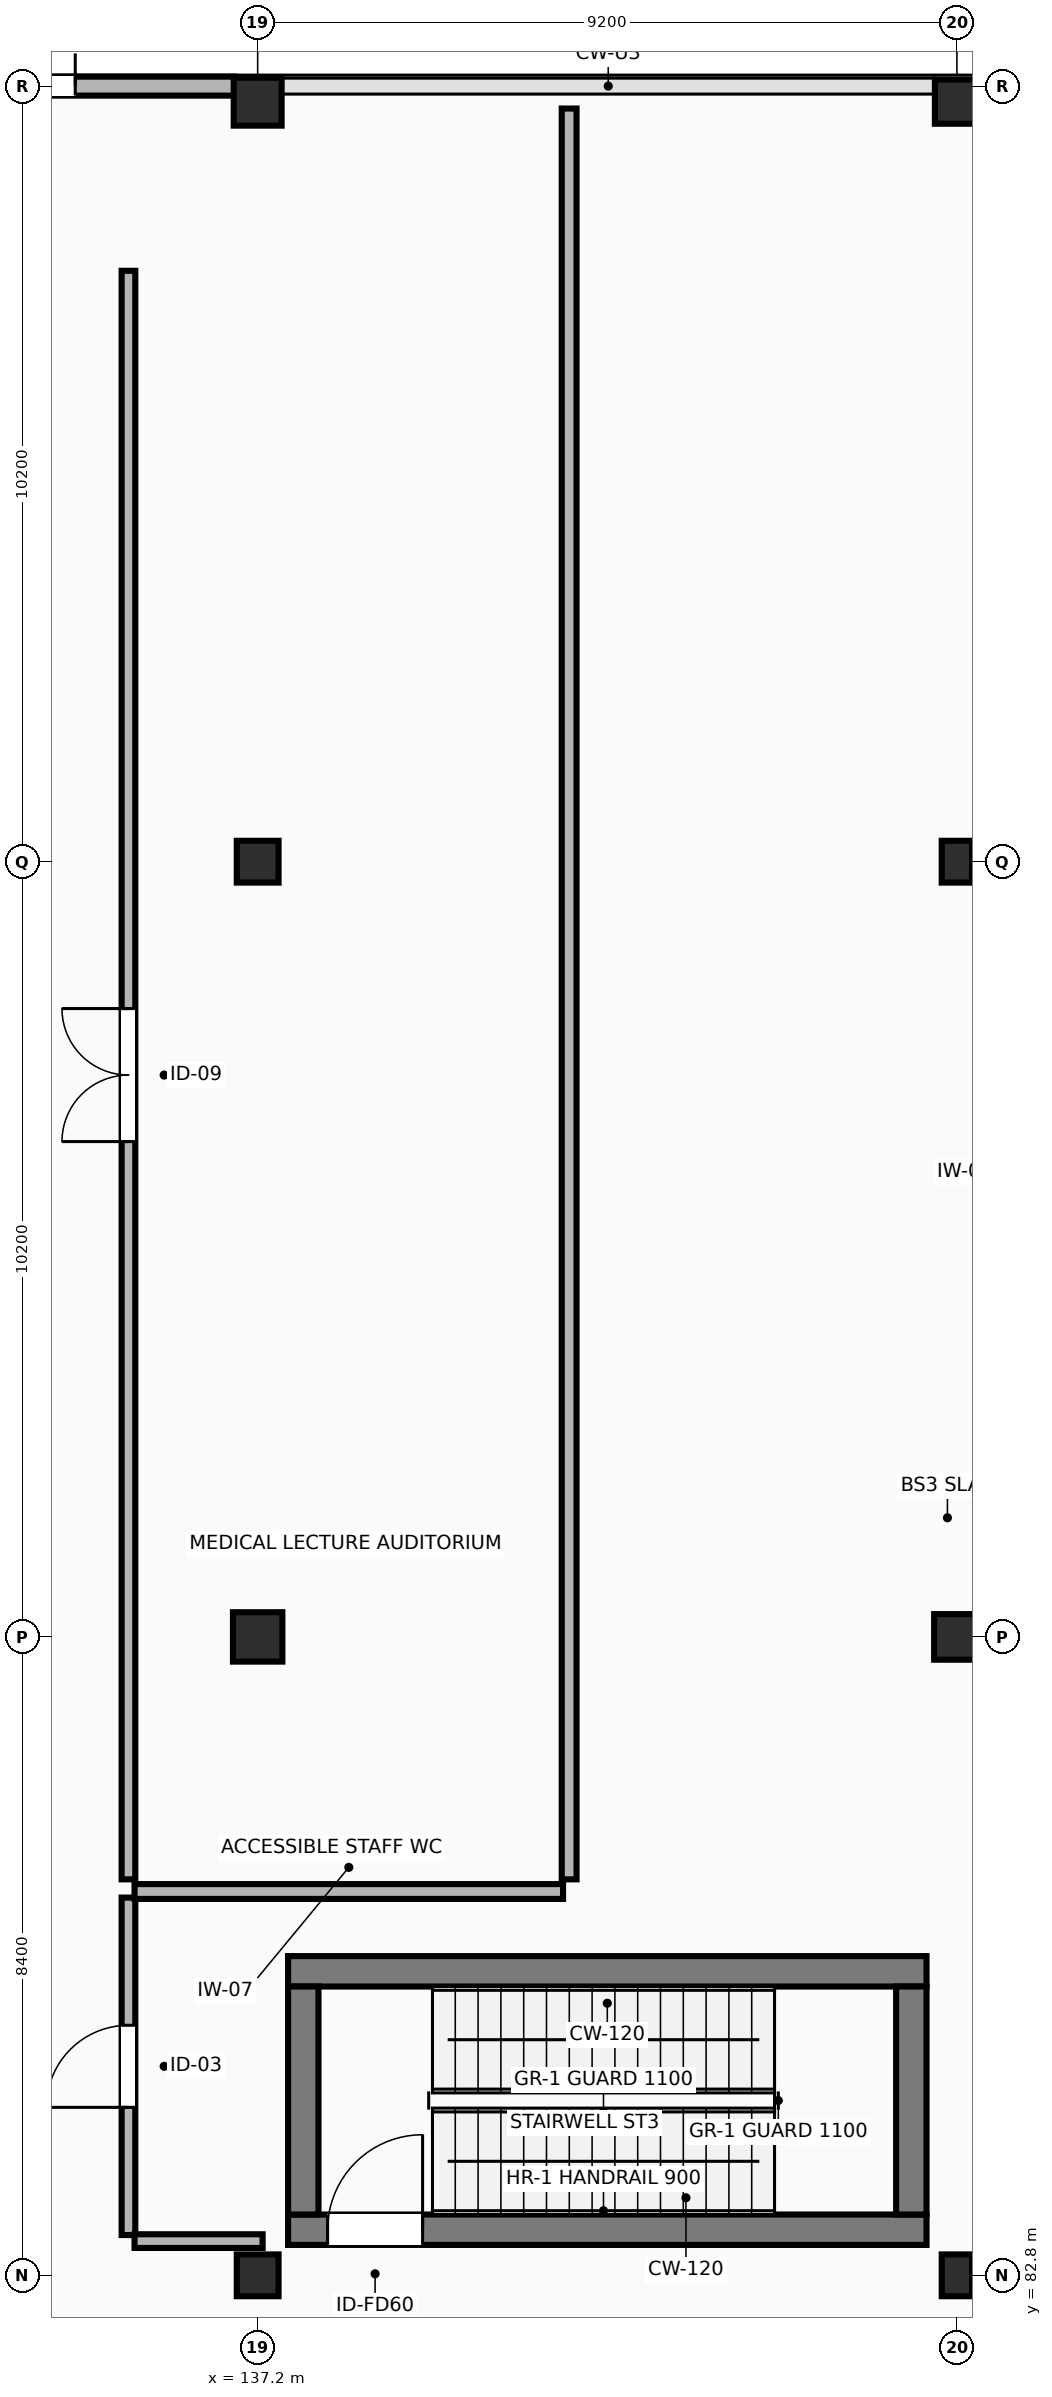
"""IFC4 building model, lengths in metres.
Left out: names, types, materials, properties, quantities, classifications, styles, units other than length and angle.
Written with IfcOpenShell. Run it as: python <this file> out.ifc"""

import sys

from ifc_helpers import new_model, si_unit, direction, frame, frame_2d, origin, origin_2d, place, context, subcontext, project, spatial, rectangle, extrude, element, fill, save


model = new_model("IFC4")
c1 = context("Model", 3, precision=1e-05, world=origin(), true_north=direction((0.0, 1.0)))
c2 = subcontext(c1, "Body", "Model", "MODEL_VIEW")
j1 = project(units=[si_unit("LENGTHUNIT", "METRE"), si_unit("PLANEANGLEUNIT", "RADIAN")], contexts=[c1])
p1 = place(None, origin())
s1 = spatial("IfcSite", under=j1, at=p1, CompositionType="ELEMENT")
p2 = place(p1, origin())
s2 = spatial("IfcBuilding", under=s1, at=p2, CompositionType="ELEMENT")
p3 = place(p2, origin())
s3 = spatial("IfcBuildingStorey", under=s2, at=p3, CompositionType="ELEMENT", Elevation=0.0)
p4 = place(p3, frame((137.2, 82.8, -1.75), z_axis=(0.0, 0.0, 1.0), x_axis=(1.0, 0.0, 0.0)))
e1 = element("IfcColumn", 1, at=p4, inside=s3, PredefinedType="COLUMN", context=c2, shape_type="SweptSolid", body=[
    extrude(rectangle(XDim=0.55, YDim=0.55, at=origin_2d()), origin(), (0.0, 0.0, 1.0), 7.15),
])
p5 = place(p3, frame((137.2, 91.2, -1.75), z_axis=(0.0, 0.0, 1.0), x_axis=(1.0, 0.0, 0.0)))
e2 = element("IfcColumn", 2, at=p5, inside=s3, PredefinedType="COLUMN", context=c2, shape_type="SweptSolid", body=[
    extrude(rectangle(XDim=0.65, YDim=0.65, at=origin_2d()), origin(), (0.0, 0.0, 1.0), 7.15),
])
p6 = place(p3, frame((137.2, 101.4, -1.75), z_axis=(0.0, 0.0, 1.0), x_axis=(1.0, 0.0, 0.0)))
e3 = element("IfcColumn", 3, at=p6, inside=s3, PredefinedType="COLUMN", context=c2, shape_type="SweptSolid", body=[
    extrude(rectangle(XDim=0.55, YDim=0.55, at=origin_2d()), origin(), (0.0, 0.0, 1.0), 7.15),
])
p7 = place(p3, frame((137.2, 111.4, -1.75), z_axis=(0.0, 0.0, 1.0), x_axis=(1.0, 0.0, 0.0)))
e4 = element("IfcColumn", 4, at=p7, inside=s3, PredefinedType="COLUMN", context=c2, shape_type="SweptSolid", body=[
    extrude(rectangle(XDim=0.63, YDim=0.63, at=origin_2d()), origin(), (0.0, 0.0, 1.0), 7.15),
])
p8 = place(p3, frame((146.4, 82.8, -1.75), z_axis=(0.0, 0.0, 1.0), x_axis=(1.0, 0.0, 0.0)))
e5 = element("IfcColumn", 5, at=p8, inside=s3, PredefinedType="COLUMN", context=c2, shape_type="SweptSolid", body=[
    extrude(rectangle(XDim=0.4, YDim=0.55, at=origin_2d()), origin(), (0.0, 0.0, 1.0), 7.15),
])
p9 = place(p3, frame((146.4, 91.2, -1.75), z_axis=(0.0, 0.0, 1.0), x_axis=(1.0, 0.0, 0.0)))
e6 = element("IfcColumn", 6, at=p9, inside=s3, PredefinedType="COLUMN", context=c2, shape_type="SweptSolid", body=[
    extrude(rectangle(XDim=0.6, YDim=0.6, at=origin_2d()), origin(), (0.0, 0.0, 1.0), 7.15),
])
p10 = place(p3, frame((146.4, 101.4, -1.75), z_axis=(0.0, 0.0, 1.0), x_axis=(1.0, 0.0, 0.0)))
e7 = element("IfcColumn", 7, at=p10, inside=s3, PredefinedType="COLUMN", context=c2, shape_type="SweptSolid", body=[
    extrude(rectangle(XDim=0.4, YDim=0.55, at=origin_2d()), origin(), (0.0, 0.0, 1.0), 7.15),
])
p11 = place(p3, frame((146.4, 111.4, -1.75), z_axis=(0.0, 0.0, 1.0), x_axis=(1.0, 0.0, 0.0)))
e8 = element("IfcColumn", 8, at=p11, inside=s3, PredefinedType="COLUMN", context=c2, shape_type="SweptSolid", body=[
    extrude(rectangle(XDim=0.58, YDim=0.58, at=origin_2d()), origin(), (0.0, 0.0, 1.0), 7.15),
])
p12 = place(p3, frame((136.89, 111.605, 0.0), z_axis=(0.0, 0.0, 1.0), x_axis=(-1.0, 0.0, 0.0)))
e9 = element("IfcWall", 9, at=p12, inside=s3, PredefinedType="STANDARD", context=c2, shape_type="SweptSolid", body=[
    extrude(rectangle(XDim=8.335, YDim=0.25, at=frame_2d((4.167, 0.0))), origin(), (0.0, 0.0, 1.0), 4.42),
])
p13 = place(p12, frame((2.09, 0.0, 0.0)))
e10 = element("IfcOpeningElement", 10, at=p13, cuts=e9, PredefinedType="OPENING", context=c2, shape_type="SweptSolid", body=[
    extrude(rectangle(XDim=2.0, YDim=2.4, at=frame_2d((1.0, 1.2))), frame((0.0, 0.135, 0.0), z_axis=(0.0, -1.0, 0.0), x_axis=(1.0, 0.0, 0.0)), (0.0, 0.0, 1.0), 0.27),
])
p14 = place(p3, frame((137.6, 83.4, -1.75), z_axis=(0.0, 0.0, 1.0), x_axis=(1.0, 0.0, 0.0)))
e11 = element("IfcWall", 11, at=p14, inside=s3, PredefinedType="SHEAR", context=c2, shape_type="SweptSolid", body=[
    extrude(rectangle(XDim=8.4, YDim=0.4, at=frame_2d((4.2, 0.0))), origin(), (0.0, 0.0, 1.0), 6.85),
])
p15 = place(p14, frame((0.52, 0.0, 1.75)))
e12 = element("IfcOpeningElement", 12, at=p15, cuts=e11, PredefinedType="OPENING", context=c2, shape_type="SweptSolid", body=[
    extrude(rectangle(XDim=1.25, YDim=2.2, at=frame_2d((0.625, 1.1))), frame((0.0, 0.21, 0.0), z_axis=(0.0, -1.0, 0.0), x_axis=(1.0, 0.0, 0.0)), (0.0, 0.0, 1.0), 0.42),
])
p16 = place(p3, frame((146.0, 86.8, -1.75), z_axis=(0.0, 0.0, 1.0), x_axis=(-1.0, 0.0, 0.0)))
e13 = element("IfcWall", 13, at=p16, inside=s3, PredefinedType="SHEAR", context=c2, shape_type="SweptSolid", body=[
    extrude(rectangle(XDim=8.4, YDim=0.4, at=frame_2d((4.2, 0.0))), origin(), (0.0, 0.0, 1.0), 6.85),
])
for number, where, z_axis, x_axis in (
    (14, (137.8, 83.6, -1.75), (0.0, 0.0, 1.0), (0.0, 1.0, 0.0)),
    (15, (145.8, 86.6, -1.75), (0.0, 0.0, 1.0), (0.0, -1.0, 0.0)),
):
    element("IfcWall", number, at=place(p3, frame(where, z_axis=z_axis, x_axis=x_axis)), inside=s3, PredefinedType="SHEAR", context=c2, shape_type="SweptSolid", body=[
        extrude(rectangle(XDim=3.0, YDim=0.4, at=frame_2d((1.5, 0.0))), origin(), (0.0, 0.0, 1.0), 6.85),
    ])
p17 = place(p3, frame((135.5, 83.33, 0.0), z_axis=(0.0, 0.0, 1.0), x_axis=(0.0, 1.0, 0.0)))
e16 = element("IfcWall", 16, at=p17, inside=s3, PredefinedType="PARTITIONING", context=c2, shape_type="SweptSolid", body=[
    extrude(rectangle(XDim=4.44, YDim=0.18, at=frame_2d((2.22, 0.0))), origin(), (0.0, 0.0, 1.0), 5.1),
])
p18 = place(p17, frame((1.68, 0.0, 0.0)))
e17 = element("IfcOpeningElement", 17, at=p18, cuts=e16, PredefinedType="OPENING", context=c2, shape_type="SweptSolid", body=[
    extrude(rectangle(XDim=1.08, YDim=2.2, at=frame_2d((0.54, 1.1))), frame((0.0, 0.1, 0.0), z_axis=(0.0, -1.0, 0.0), x_axis=(1.0, 0.0, 0.0)), (0.0, 0.0, 1.0), 0.2),
])
p19 = place(p3, frame((135.58, 87.85, 0.0), z_axis=(0.0, 0.0, 1.0), x_axis=(1.0, 0.0, 0.0)))
e18 = element("IfcWall", 18, at=p19, inside=s3, PredefinedType="PARTITIONING", context=c2, shape_type="SweptSolid", body=[
    extrude(rectangle(XDim=5.638, YDim=0.195, at=frame_2d((2.819, 0.0))), origin(), (0.0, 0.0, 1.0), 5.1),
])
p20 = place(p3, frame((137.265, 83.25, 0.0), z_axis=(0.0, 0.0, 1.0), x_axis=(-1.0, 0.0, 0.0)))
e19 = element("IfcWall", 19, at=p20, inside=s3, PredefinedType="PARTITIONING", context=c2, shape_type="SweptSolid", body=[
    extrude(rectangle(XDim=1.685, YDim=0.18, at=frame_2d((0.842, 0.0))), origin(), (0.0, 0.0, 1.0), 4.435),
])
p21 = place(p3, frame((141.298, 111.31, 0.0), z_axis=(0.0, 0.0, 1.0), x_axis=(0.0, -1.0, 0.0)))
e20 = element("IfcWall", 20, at=p21, inside=s3, PredefinedType="PARTITIONING", context=c2, shape_type="SweptSolid", body=[
    extrude(rectangle(XDim=23.3, YDim=0.195, at=frame_2d((11.65, 0.0))), origin(), (0.0, 0.0, 1.0), 5.1),
])
p22 = place(p3, frame((135.5, 88.01, 0.0), z_axis=(0.0, 0.0, 1.0), x_axis=(0.0, 1.0, 0.0)))
e21 = element("IfcWall", 21, at=p22, inside=s3, PredefinedType="PARTITIONING", context=c2, shape_type="SweptSolid", body=[
    extrude(rectangle(XDim=21.165, YDim=0.18, at=frame_2d((10.583, 0.0))), origin(), (0.0, 0.0, 1.0), 5.1),
])
p23 = place(p22, frame((9.708, 0.0, 0.0)))
e22 = element("IfcOpeningElement", 22, at=p23, cuts=e21, PredefinedType="OPENING", context=c2, shape_type="SweptSolid", body=[
    extrude(rectangle(XDim=1.75, YDim=2.35, at=frame_2d((0.875, 1.175))), frame((0.0, 0.1, 0.0), z_axis=(0.0, -1.0, 0.0), x_axis=(1.0, 0.0, 0.0)), (0.0, 0.0, 1.0), 0.2),
])
p24 = place(p13, frame((2.0, 0.0, 0.0), z_axis=(0.0, 0.0, 1.0), x_axis=(-1.0, 0.0, 0.0)))
e23 = element("IfcDoor", 23, at=p24, inside=s3, OperationType="DOUBLE_DOOR_SINGLE_SWING", PredefinedType="DOOR", context=c2, shape_type="SweptSolid", body=[
    extrude(rectangle(XDim=2.0, YDim=2.4, at=frame_2d((1.0, 1.2))), frame((0.0, 0.025, 0.0), z_axis=(0.0, -1.0, 0.0), x_axis=(1.0, 0.0, 0.0)), (0.0, 0.0, 1.0), 0.05),
])
fill(e10, e23)
p25 = place(p15, origin())
e24 = element("IfcDoor", 24, at=p25, inside=s3, OperationType="SINGLE_SWING_RIGHT", PredefinedType="DOOR", context=c2, shape_type="SweptSolid", body=[
    extrude(rectangle(XDim=1.25, YDim=2.2, at=frame_2d((0.625, 1.1))), frame((0.0, 0.025, 0.0), z_axis=(0.0, -1.0, 0.0), x_axis=(1.0, 0.0, 0.0)), (0.0, 0.0, 1.0), 0.05),
])
fill(e12, e24)
p26 = place(p18, origin())
e25 = element("IfcDoor", 25, at=p26, inside=s3, OperationType="SINGLE_SWING_LEFT", PredefinedType="DOOR", context=c2, shape_type="SweptSolid", body=[
    extrude(rectangle(XDim=1.08, YDim=2.2, at=frame_2d((0.54, 1.1))), frame((0.0, 0.025, 0.0), z_axis=(0.0, -1.0, 0.0), x_axis=(1.0, 0.0, 0.0)), (0.0, 0.0, 1.0), 0.05),
])
fill(e17, e25)
p27 = place(p23, origin())
e26 = element("IfcDoor", 26, at=p27, inside=s3, OperationType="DOUBLE_DOOR_SINGLE_SWING", PredefinedType="DOOR", context=c2, shape_type="SweptSolid", body=[
    extrude(rectangle(XDim=1.75, YDim=2.35, at=frame_2d((0.875, 1.175))), frame((0.0, 0.025, 0.0), z_axis=(0.0, -1.0, 0.0), x_axis=(1.0, 0.0, 0.0)), (0.0, 0.0, 1.0), 0.05),
])
fill(e22, e26)
save(model, sys.argv[1])
